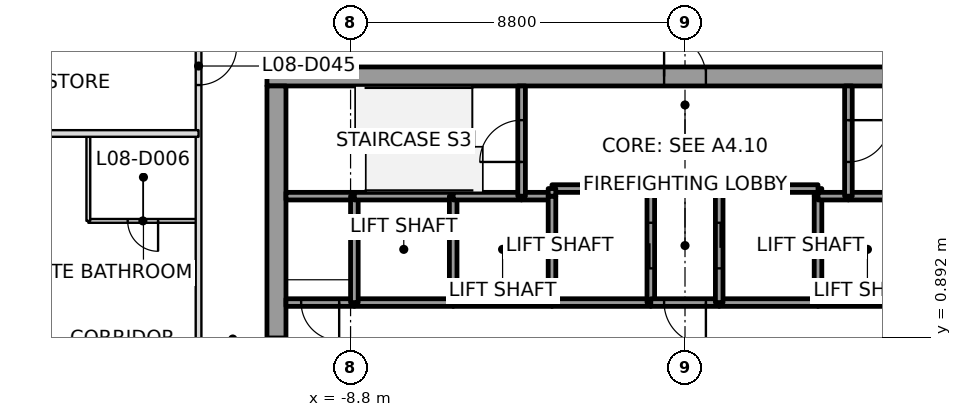
"""IFC4 building model, lengths in metres.
Left out: names, types, materials, properties, quantities, classifications, styles, units other than length and angle.
Written with IfcOpenShell. Run it as: python <this file> out.ifc"""

import sys

from ifc_helpers import new_model, si_unit, direction, frame, frame_2d, origin, place, context, subcontext, project, spatial, rectangle, extrude, element, fill, save


model = new_model("IFC4")
c1 = context("Model", 3, precision=1e-05, world=origin(), true_north=direction((0.0, 1.0)))
c2 = subcontext(c1, "Body", "Model", "MODEL_VIEW")
j1 = project(units=[si_unit("LENGTHUNIT", "METRE"), si_unit("PLANEANGLEUNIT", "RADIAN")], contexts=[c1])
p1 = place(None, origin())
s1 = spatial("IfcSite", under=j1, at=p1, CompositionType="ELEMENT")
p2 = place(p1, origin())
s2 = spatial("IfcBuilding", under=s1, at=p2, CompositionType="ELEMENT")
p3 = place(p2, frame((0.0, 0.0, 51.7)))
s3 = spatial("IfcBuildingStorey", under=s2, at=p3, CompositionType="ELEMENT", Elevation=51.7)
p4 = place(p3, frame((-11.0, 7.75, 0.0), z_axis=(0.0, 0.0, 1.0), x_axis=(1.0, 0.0, 0.0)))
e1 = element("IfcWall", 1, at=p4, inside=s3, PredefinedType="SHEAR", context=c2, shape_type="SweptSolid", body=[
    extrude(rectangle(XDim=22.0, YDim=0.5, at=frame_2d((11.0, 0.0))), origin(), (0.0, 0.0, 1.0), 3.7),
])
p5 = place(p4, frame((10.45, 0.0, 0.0)))
e2 = element("IfcOpeningElement", 2, at=p5, cuts=e1, PredefinedType="OPENING", context=c2, shape_type="SweptSolid", body=[
    extrude(rectangle(XDim=1.1, YDim=2.1, at=frame_2d((0.55, 1.05))), frame((0.0, 0.25, 0.0), z_axis=(0.0, -1.0, 0.0), x_axis=(1.0, 0.0, 0.0)), (0.0, 0.0, 1.0), 0.5),
])
p6 = place(p3, frame((-10.75, -7.5, 0.0), z_axis=(0.0, 0.0, 1.0), x_axis=(0.0, 1.0, 0.0)))
e3 = element("IfcWall", 3, at=p6, inside=s3, PredefinedType="SHEAR", context=c2, shape_type="SweptSolid", body=[
    extrude(rectangle(XDim=15.0, YDim=0.5, at=frame_2d((7.5, 0.0))), origin(), (0.0, 0.0, 1.0), 3.7),
])
p7 = place(p6, frame((6.6, 0.0, 0.0)))
e4 = element("IfcOpeningElement", 4, at=p7, cuts=e3, PredefinedType="OPENING", context=c2, shape_type="SweptSolid", body=[
    extrude(rectangle(XDim=1.8, YDim=2.1, at=frame_2d((0.9, 1.05))), frame((0.0, 0.25, 0.0), z_axis=(0.0, -1.0, 0.0), x_axis=(1.0, 0.0, 0.0)), (0.0, 0.0, 1.0), 0.5),
])
p8 = place(p3, frame((-8.7, 1.8, 0.0), z_axis=(0.0, 0.0, 1.0), x_axis=(-1.0, 0.0, 0.0)))
e5 = element("IfcWall", 5, at=p8, inside=s3, PredefinedType="SOLIDWALL", context=c2, shape_type="SweptSolid", body=[
    extrude(rectangle(XDim=1.8, YDim=0.2, at=frame_2d((0.9, 0.0))), origin(), (0.0, 0.0, 1.0), 3.55),
])
p9 = place(p8, frame((0.4, 0.0, 0.0)))
e6 = element("IfcOpeningElement", 6, at=p9, cuts=e5, PredefinedType="OPENING", context=c2, shape_type="SweptSolid", body=[
    extrude(rectangle(XDim=1.0, YDim=2.1, at=frame_2d((0.5, 1.05))), frame((0.0, 0.1, 0.0), z_axis=(0.0, -1.0, 0.0), x_axis=(1.0, 0.0, 0.0)), (0.0, 0.0, 1.0), 0.2),
])
p10 = place(p3, frame((-8.7, 4.6, 0.0), z_axis=(0.0, 0.0, 1.0), x_axis=(-1.0, 0.0, 0.0)))
e7 = element("IfcWall", 7, at=p10, inside=s3, PredefinedType="SOLIDWALL", context=c2, shape_type="SweptSolid", body=[
    extrude(rectangle(XDim=1.8, YDim=0.2, at=frame_2d((0.9, 0.0))), origin(), (0.0, 0.0, 1.0), 3.55),
])
p11 = place(p3, frame((-6.1, 1.8, 0.0), z_axis=(0.0, 0.0, 1.0), x_axis=(-1.0, 0.0, 0.0)))
e8 = element("IfcWall", 8, at=p11, inside=s3, PredefinedType="SOLIDWALL", context=c2, shape_type="SweptSolid", body=[
    extrude(rectangle(XDim=2.6, YDim=0.2, at=frame_2d((1.3, 0.0))), origin(), (0.0, 0.0, 1.0), 3.55),
])
p12 = place(p3, frame((-8.7, 1.8, 0.0), z_axis=(0.0, 0.0, 1.0), x_axis=(0.0, 1.0, 0.0)))
e9 = element("IfcWall", 9, at=p12, inside=s3, PredefinedType="SOLIDWALL", context=c2, shape_type="SweptSolid", body=[
    extrude(rectangle(XDim=2.8, YDim=0.2, at=frame_2d((1.4, 0.0))), origin(), (0.0, 0.0, 1.0), 3.55),
])
p13 = place(p3, frame((-6.1, 4.6, 0.0), z_axis=(0.0, 0.0, 1.0), x_axis=(-1.0, 0.0, 0.0)))
e10 = element("IfcWall", 10, at=p13, inside=s3, PredefinedType="SOLIDWALL", context=c2, shape_type="SweptSolid", body=[
    extrude(rectangle(XDim=2.6, YDim=0.2, at=frame_2d((1.3, 0.0))), origin(), (0.0, 0.0, 1.0), 3.55),
])
p14 = place(p3, frame((-3.5, 1.8, 0.0), z_axis=(0.0, 0.0, 1.0), x_axis=(-1.0, 0.0, 0.0)))
e11 = element("IfcWall", 11, at=p14, inside=s3, PredefinedType="SOLIDWALL", context=c2, shape_type="SweptSolid", body=[
    extrude(rectangle(XDim=2.6, YDim=0.2, at=frame_2d((1.3, 0.0))), origin(), (0.0, 0.0, 1.0), 3.55),
])
p15 = place(p3, frame((-6.1, 1.8, 0.0), z_axis=(0.0, 0.0, 1.0), x_axis=(0.0, 1.0, 0.0)))
e12 = element("IfcWall", 12, at=p15, inside=s3, PredefinedType="SOLIDWALL", context=c2, shape_type="SweptSolid", body=[
    extrude(rectangle(XDim=2.8, YDim=0.2, at=frame_2d((1.4, 0.0))), origin(), (0.0, 0.0, 1.0), 3.55),
])
p16 = place(p3, frame((-4.3, 4.6, 0.0), z_axis=(0.0, 0.0, 1.0), x_axis=(-1.0, 0.0, 0.0)))
e13 = element("IfcWall", 13, at=p16, inside=s3, PredefinedType="SOLIDWALL", context=c2, shape_type="SweptSolid", body=[
    extrude(rectangle(XDim=1.8, YDim=0.2, at=frame_2d((0.9, 0.0))), origin(), (0.0, 0.0, 1.0), 3.55),
])
p17 = place(p3, frame((-3.5, 4.6, 0.0), z_axis=(0.0, 0.0, 1.0), x_axis=(-1.0, 0.0, 0.0)))
e14 = element("IfcWall", 14, at=p17, inside=s3, PredefinedType="SOLIDWALL", context=c2, shape_type="SweptSolid", body=[
    extrude(rectangle(XDim=0.8, YDim=0.2, at=frame_2d((0.4, 0.0))), origin(), (0.0, 0.0, 1.0), 3.55),
])
p18 = place(p3, frame((-4.3, 4.6, 0.0), z_axis=(0.0, 0.0, 1.0), x_axis=(0.0, 1.0, 0.0)))
e15 = element("IfcWall", 15, at=p18, inside=s3, PredefinedType="SOLIDWALL", context=c2, shape_type="SweptSolid", body=[
    extrude(rectangle(XDim=2.9, YDim=0.2, at=frame_2d((1.45, 0.0))), origin(), (0.0, 0.0, 1.0), 3.55),
])
p19 = place(p18, frame((0.9, 0.0, 0.0)))
e16 = element("IfcOpeningElement", 16, at=p19, cuts=e15, PredefinedType="OPENING", context=c2, shape_type="SweptSolid", body=[
    extrude(rectangle(XDim=1.1, YDim=2.1, at=frame_2d((0.55, 1.05))), frame((0.0, 0.1, 0.0), z_axis=(0.0, -1.0, 0.0), x_axis=(1.0, 0.0, 0.0)), (0.0, 0.0, 1.0), 0.2),
])
p20 = place(p3, frame((-0.9, 1.8, 0.0), z_axis=(0.0, 0.0, 1.0), x_axis=(-1.0, 0.0, 0.0)))
e17 = element("IfcWall", 17, at=p20, inside=s3, PredefinedType="SOLIDWALL", context=c2, shape_type="SweptSolid", body=[
    extrude(rectangle(XDim=2.6, YDim=0.2, at=frame_2d((1.3, 0.0))), origin(), (0.0, 0.0, 1.0), 3.55),
])
p21 = place(p3, frame((-3.5, 4.6, 0.0), z_axis=(0.0, 0.0, 1.0), x_axis=(0.0, -1.0, 0.0)))
e18 = element("IfcWall", 18, at=p21, inside=s3, PredefinedType="SOLIDWALL", context=c2, shape_type="SweptSolid", body=[
    extrude(rectangle(XDim=2.8, YDim=0.2, at=frame_2d((1.4, 0.0))), origin(), (0.0, 0.0, 1.0), 3.55),
])
p22 = place(p3, frame((-0.9, 1.8, 0.0), z_axis=(0.0, 0.0, 1.0), x_axis=(0.0, 1.0, 0.0)))
e19 = element("IfcWall", 19, at=p22, inside=s3, PredefinedType="SOLIDWALL", context=c2, shape_type="SweptSolid", body=[
    extrude(rectangle(XDim=3.0, YDim=0.2, at=frame_2d((1.5, 0.0))), origin(), (0.0, 0.0, 1.0), 3.55),
])
p23 = place(p22, frame((0.9, 0.0, 0.0)))
e20 = element("IfcOpeningElement", 20, at=p23, cuts=e19, PredefinedType="OPENING", context=c2, shape_type="SweptSolid", body=[
    extrude(rectangle(XDim=1.2, YDim=2.1, at=frame_2d((0.6, 1.05))), frame((0.0, 0.1, 0.0), z_axis=(0.0, -1.0, 0.0), x_axis=(1.0, 0.0, 0.0)), (0.0, 0.0, 1.0), 0.2),
])
p24 = place(p3, frame((-0.9, 4.8, 0.0), z_axis=(0.0, 0.0, 1.0), x_axis=(-1.0, 0.0, 0.0)))
e21 = element("IfcWall", 21, at=p24, inside=s3, PredefinedType="SOLIDWALL", context=c2, shape_type="SweptSolid", body=[
    extrude(rectangle(XDim=2.6, YDim=0.2, at=frame_2d((1.3, 0.0))), origin(), (0.0, 0.0, 1.0), 3.55),
])
p25 = place(p3, frame((-3.5, 4.8, 0.0), z_axis=(0.0, 0.0, 1.0), x_axis=(0.0, -1.0, 0.0)))
e22 = element("IfcWall", 22, at=p25, inside=s3, PredefinedType="SOLIDWALL", context=c2, shape_type="SweptSolid", body=[
    extrude(rectangle(XDim=0.2, YDim=0.2, at=frame_2d((0.1, 0.0))), origin(), (0.0, 0.0, 1.0), 3.55),
])
p26 = place(p3, frame((0.9, 1.8, 0.0), z_axis=(0.0, 0.0, 1.0), x_axis=(-1.0, 0.0, 0.0)))
e23 = element("IfcWall", 23, at=p26, inside=s3, PredefinedType="SOLIDWALL", context=c2, shape_type="SweptSolid", body=[
    extrude(rectangle(XDim=1.8, YDim=0.2, at=frame_2d((0.9, 0.0))), origin(), (0.0, 0.0, 1.0), 3.55),
])
p27 = place(p26, frame((0.35, 0.0, 0.0)))
e24 = element("IfcOpeningElement", 24, at=p27, cuts=e23, PredefinedType="OPENING", context=c2, shape_type="SweptSolid", body=[
    extrude(rectangle(XDim=1.1, YDim=2.1, at=frame_2d((0.55, 1.05))), frame((0.0, 0.1, 0.0), z_axis=(0.0, -1.0, 0.0), x_axis=(1.0, 0.0, 0.0)), (0.0, 0.0, 1.0), 0.2),
])
p28 = place(p3, frame((3.5, 1.8, 0.0), z_axis=(0.0, 0.0, 1.0), x_axis=(-1.0, 0.0, 0.0)))
e25 = element("IfcWall", 25, at=p28, inside=s3, PredefinedType="SOLIDWALL", context=c2, shape_type="SweptSolid", body=[
    extrude(rectangle(XDim=2.6, YDim=0.2, at=frame_2d((1.3, 0.0))), origin(), (0.0, 0.0, 1.0), 3.55),
])
p29 = place(p3, frame((3.5, 4.6, 0.0), z_axis=(0.0, 0.0, 1.0), x_axis=(0.0, 1.0, 0.0)))
e26 = element("IfcWall", 26, at=p29, inside=s3, PredefinedType="SOLIDWALL", context=c2, shape_type="SweptSolid", body=[
    extrude(rectangle(XDim=0.2, YDim=0.2, at=frame_2d((0.1, 0.0))), origin(), (0.0, 0.0, 1.0), 3.55),
])
p30 = place(p3, frame((3.5, 4.8, 0.0), z_axis=(0.0, 0.0, 1.0), x_axis=(-1.0, 0.0, 0.0)))
e27 = element("IfcWall", 27, at=p30, inside=s3, PredefinedType="SOLIDWALL", context=c2, shape_type="SweptSolid", body=[
    extrude(rectangle(XDim=2.6, YDim=0.2, at=frame_2d((1.3, 0.0))), origin(), (0.0, 0.0, 1.0), 3.55),
])
p31 = place(p3, frame((0.9, 4.8, 0.0), z_axis=(0.0, 0.0, 1.0), x_axis=(0.0, -1.0, 0.0)))
e28 = element("IfcWall", 28, at=p31, inside=s3, PredefinedType="SOLIDWALL", context=c2, shape_type="SweptSolid", body=[
    extrude(rectangle(XDim=3.0, YDim=0.2, at=frame_2d((1.5, 0.0))), origin(), (0.0, 0.0, 1.0), 3.55),
])
p32 = place(p31, frame((0.9, 0.0, 0.0)))
e29 = element("IfcOpeningElement", 29, at=p32, cuts=e28, PredefinedType="OPENING", context=c2, shape_type="SweptSolid", body=[
    extrude(rectangle(XDim=1.2, YDim=2.1, at=frame_2d((0.6, 1.05))), frame((0.0, 0.1, 0.0), z_axis=(0.0, -1.0, 0.0), x_axis=(1.0, 0.0, 0.0)), (0.0, 0.0, 1.0), 0.2),
])
p33 = place(p3, frame((6.1, 1.8, 0.0), z_axis=(0.0, 0.0, 1.0), x_axis=(-1.0, 0.0, 0.0)))
e30 = element("IfcWall", 30, at=p33, inside=s3, PredefinedType="SOLIDWALL", context=c2, shape_type="SweptSolid", body=[
    extrude(rectangle(XDim=2.6, YDim=0.2, at=frame_2d((1.3, 0.0))), origin(), (0.0, 0.0, 1.0), 3.55),
])
p34 = place(p3, frame((3.5, 1.8, 0.0), z_axis=(0.0, 0.0, 1.0), x_axis=(0.0, 1.0, 0.0)))
e31 = element("IfcWall", 31, at=p34, inside=s3, PredefinedType="SOLIDWALL", context=c2, shape_type="SweptSolid", body=[
    extrude(rectangle(XDim=2.8, YDim=0.2, at=frame_2d((1.4, 0.0))), origin(), (0.0, 0.0, 1.0), 3.55),
])
p35 = place(p3, frame((4.3, 4.6, 0.0), z_axis=(0.0, 0.0, 1.0), x_axis=(-1.0, 0.0, 0.0)))
e32 = element("IfcWall", 32, at=p35, inside=s3, PredefinedType="SOLIDWALL", context=c2, shape_type="SweptSolid", body=[
    extrude(rectangle(XDim=0.8, YDim=0.2, at=frame_2d((0.4, 0.0))), origin(), (0.0, 0.0, 1.0), 3.55),
])
p36 = place(p3, frame((6.1, 4.6, 0.0), z_axis=(0.0, 0.0, 1.0), x_axis=(-1.0, 0.0, 0.0)))
e33 = element("IfcWall", 33, at=p36, inside=s3, PredefinedType="SOLIDWALL", context=c2, shape_type="SweptSolid", body=[
    extrude(rectangle(XDim=1.8, YDim=0.2, at=frame_2d((0.9, 0.0))), origin(), (0.0, 0.0, 1.0), 3.55),
])
p37 = place(p3, frame((4.3, 7.5, 0.0), z_axis=(0.0, 0.0, 1.0), x_axis=(0.0, -1.0, 0.0)))
e34 = element("IfcWall", 34, at=p37, inside=s3, PredefinedType="SOLIDWALL", context=c2, shape_type="SweptSolid", body=[
    extrude(rectangle(XDim=2.9, YDim=0.2, at=frame_2d((1.45, 0.0))), origin(), (0.0, 0.0, 1.0), 3.55),
])
p38 = place(p37, frame((0.9, 0.0, 0.0)))
e35 = element("IfcOpeningElement", 35, at=p38, cuts=e34, PredefinedType="OPENING", context=c2, shape_type="SweptSolid", body=[
    extrude(rectangle(XDim=1.1, YDim=2.1, at=frame_2d((0.55, 1.05))), frame((0.0, 0.1, 0.0), z_axis=(0.0, -1.0, 0.0), x_axis=(1.0, 0.0, 0.0)), (0.0, 0.0, 1.0), 0.2),
])
p39 = place(p3, frame((-20.075, 6.249, 0.0), z_axis=(0.0, 0.0, 1.0), x_axis=(1.0, 0.0, 0.0)))
e36 = element("IfcWall", 36, at=p39, inside=s3, PredefinedType="PARTITIONING", context=c2, shape_type="SweptSolid", body=[
    extrude(rectangle(XDim=7.275, YDim=0.175, at=frame_2d((3.637, 0.0))), origin(), (0.0, 0.0, 1.0), 3.093),
])
p40 = place(p3, frame((-12.8, 9.72, 0.0), z_axis=(0.0, 0.0, 1.0), x_axis=(0.0, -1.0, 0.0)))
e37 = element("IfcWall", 37, at=p40, inside=s3, PredefinedType="PARTITIONING", context=c2, shape_type="SweptSolid", body=[
    extrude(rectangle(XDim=16.071, YDim=0.15, at=frame_2d((8.035, 0.0))), origin(), (0.0, 0.0, 1.0), 3.017),
])
p41 = place(p40, frame((1.195, 0.0, 0.0)))
e38 = element("IfcOpeningElement", 38, at=p41, cuts=e37, PredefinedType="OPENING", context=c2, shape_type="SweptSolid", body=[
    extrude(rectangle(XDim=1.0, YDim=2.1, at=frame_2d((0.5, 1.05))), frame((0.0, 0.075, 0.0), z_axis=(0.0, -1.0, 0.0), x_axis=(1.0, 0.0, 0.0)), (0.0, 0.0, 1.0), 0.15),
])
p42 = place(p40, frame((10.471, 0.0, 0.0)))
e39 = element("IfcOpeningElement", 39, at=p42, cuts=e37, PredefinedType="OPENING", context=c2, shape_type="SweptSolid", body=[
    extrude(rectangle(XDim=1.0, YDim=2.1, at=frame_2d((0.5, 1.05))), frame((0.0, 0.075, 0.0), z_axis=(0.0, -1.0, 0.0), x_axis=(1.0, 0.0, 0.0)), (0.0, 0.0, 1.0), 0.15),
])
p43 = place(p3, frame((-12.83, 3.949, 0.0), z_axis=(0.0, 0.0, 1.0), x_axis=(-1.0, 0.0, 0.0)))
e40 = element("IfcWall", 40, at=p43, inside=s3, PredefinedType="PARTITIONING", context=c2, shape_type="SweptSolid", body=[
    extrude(rectangle(XDim=2.87, YDim=0.1, at=frame_2d((1.435, 0.0))), origin(), (0.0, 0.0, 1.0), 3.093),
])
p44 = place(p43, frame((1.035, 0.0, 0.0)))
e41 = element("IfcOpeningElement", 41, at=p44, cuts=e40, PredefinedType="OPENING", context=c2, shape_type="SweptSolid", body=[
    extrude(rectangle(XDim=0.8, YDim=2.1, at=frame_2d((0.4, 1.05))), frame((0.0, 0.05, 0.0), z_axis=(0.0, -1.0, 0.0), x_axis=(1.0, 0.0, 0.0)), (0.0, 0.0, 1.0), 0.1),
])
p45 = place(p3, frame((-15.7, 3.949, 0.0), z_axis=(0.0, 0.0, 1.0), x_axis=(0.0, 1.0, 0.0)))
e42 = element("IfcWall", 42, at=p45, inside=s3, PredefinedType="PARTITIONING", context=c2, shape_type="SweptSolid", body=[
    extrude(rectangle(XDim=2.27, YDim=0.1, at=frame_2d((1.135, 0.0))), origin(), (0.0, 0.0, 1.0), 3.093),
])
p46 = place(p41, origin())
e43 = element("IfcDoor", 43, at=p46, inside=s3, OperationType="SINGLE_SWING_LEFT", PredefinedType="DOOR", context=c2, shape_type="SweptSolid", body=[
    extrude(rectangle(XDim=1.0, YDim=2.1, at=frame_2d((0.5, 1.05))), frame((0.0, 0.025, 0.0), z_axis=(0.0, -1.0, 0.0), x_axis=(1.0, 0.0, 0.0)), (0.0, 0.0, 1.0), 0.05),
])
fill(e38, e43)
p47 = place(p44, origin())
e44 = element("IfcDoor", 44, at=p47, inside=s3, OperationType="SINGLE_SWING_LEFT", PredefinedType="DOOR", context=c2, shape_type="SweptSolid", body=[
    extrude(rectangle(XDim=0.8, YDim=2.1, at=frame_2d((0.4, 1.05))), frame((0.0, 0.025, 0.0), z_axis=(0.0, -1.0, 0.0), x_axis=(1.0, 0.0, 0.0)), (0.0, 0.0, 1.0), 0.05),
])
fill(e41, e44)
p48 = place(p23, origin())
e45 = element("IfcDoor", 45, at=p48, inside=s3, OperationType="SLIDING_TO_LEFT", PredefinedType="DOOR", context=c2, shape_type="SweptSolid", body=[
    extrude(rectangle(XDim=1.2, YDim=2.1, at=frame_2d((0.6, 1.05))), frame((0.0, 0.025, 0.0), z_axis=(0.0, -1.0, 0.0), x_axis=(1.0, 0.0, 0.0)), (0.0, 0.0, 1.0), 0.05),
])
fill(e20, e45)
p49 = place(p32, origin())
e46 = element("IfcDoor", 46, at=p49, inside=s3, OperationType="SLIDING_TO_LEFT", PredefinedType="DOOR", context=c2, shape_type="SweptSolid", body=[
    extrude(rectangle(XDim=1.2, YDim=2.1, at=frame_2d((0.6, 1.05))), frame((0.0, 0.025, 0.0), z_axis=(0.0, -1.0, 0.0), x_axis=(1.0, 0.0, 0.0)), (0.0, 0.0, 1.0), 0.05),
])
fill(e29, e46)
p50 = place(p27, origin())
e47 = element("IfcDoor", 47, at=p50, inside=s3, OperationType="SINGLE_SWING_RIGHT", PredefinedType="DOOR", context=c2, shape_type="SweptSolid", body=[
    extrude(rectangle(XDim=1.1, YDim=2.1, at=frame_2d((0.55, 1.05))), frame((0.0, 0.025, 0.0), z_axis=(0.0, -1.0, 0.0), x_axis=(1.0, 0.0, 0.0)), (0.0, 0.0, 1.0), 0.05),
])
fill(e24, e47)
p51 = place(p9, origin())
e48 = element("IfcDoor", 48, at=p51, inside=s3, OperationType="SINGLE_SWING_LEFT", PredefinedType="DOOR", context=c2, shape_type="SweptSolid", body=[
    extrude(rectangle(XDim=1.0, YDim=2.1, at=frame_2d((0.5, 1.05))), frame((0.0, 0.025, 0.0), z_axis=(0.0, -1.0, 0.0), x_axis=(1.0, 0.0, 0.0)), (0.0, 0.0, 1.0), 0.05),
])
fill(e6, e48)
p52 = place(p19, origin())
e49 = element("IfcDoor", 49, at=p52, inside=s3, OperationType="SINGLE_SWING_RIGHT", PredefinedType="DOOR", context=c2, shape_type="SweptSolid", body=[
    extrude(rectangle(XDim=1.1, YDim=2.1, at=frame_2d((0.55, 1.05))), frame((0.0, 0.025, 0.0), z_axis=(0.0, -1.0, 0.0), x_axis=(1.0, 0.0, 0.0)), (0.0, 0.0, 1.0), 0.05),
])
fill(e16, e49)
p53 = place(p38, origin())
e50 = element("IfcDoor", 50, at=p53, inside=s3, OperationType="SINGLE_SWING_LEFT", PredefinedType="DOOR", context=c2, shape_type="SweptSolid", body=[
    extrude(rectangle(XDim=1.1, YDim=2.1, at=frame_2d((0.55, 1.05))), frame((0.0, 0.025, 0.0), z_axis=(0.0, -1.0, 0.0), x_axis=(1.0, 0.0, 0.0)), (0.0, 0.0, 1.0), 0.05),
])
fill(e35, e50)
p54 = place(p7, origin())
e51 = element("IfcDoor", 51, at=p54, inside=s3, OperationType="DOUBLE_DOOR_SINGLE_SWING", PredefinedType="DOOR", context=c2, shape_type="SweptSolid", body=[
    extrude(rectangle(XDim=1.8, YDim=2.1, at=frame_2d((0.9, 1.05))), frame((0.0, 0.025, 0.0), z_axis=(0.0, -1.0, 0.0), x_axis=(1.0, 0.0, 0.0)), (0.0, 0.0, 1.0), 0.05),
])
fill(e4, e51)
p55 = place(p5, origin())
e52 = element("IfcDoor", 52, at=p55, inside=s3, OperationType="SINGLE_SWING_RIGHT", PredefinedType="DOOR", context=c2, shape_type="SweptSolid", body=[
    extrude(rectangle(XDim=1.1, YDim=2.1, at=frame_2d((0.55, 1.05))), frame((0.0, 0.025, 0.0), z_axis=(0.0, -1.0, 0.0), x_axis=(1.0, 0.0, 0.0)), (0.0, 0.0, 1.0), 0.05),
])
fill(e2, e52)
save(model, sys.argv[1])
